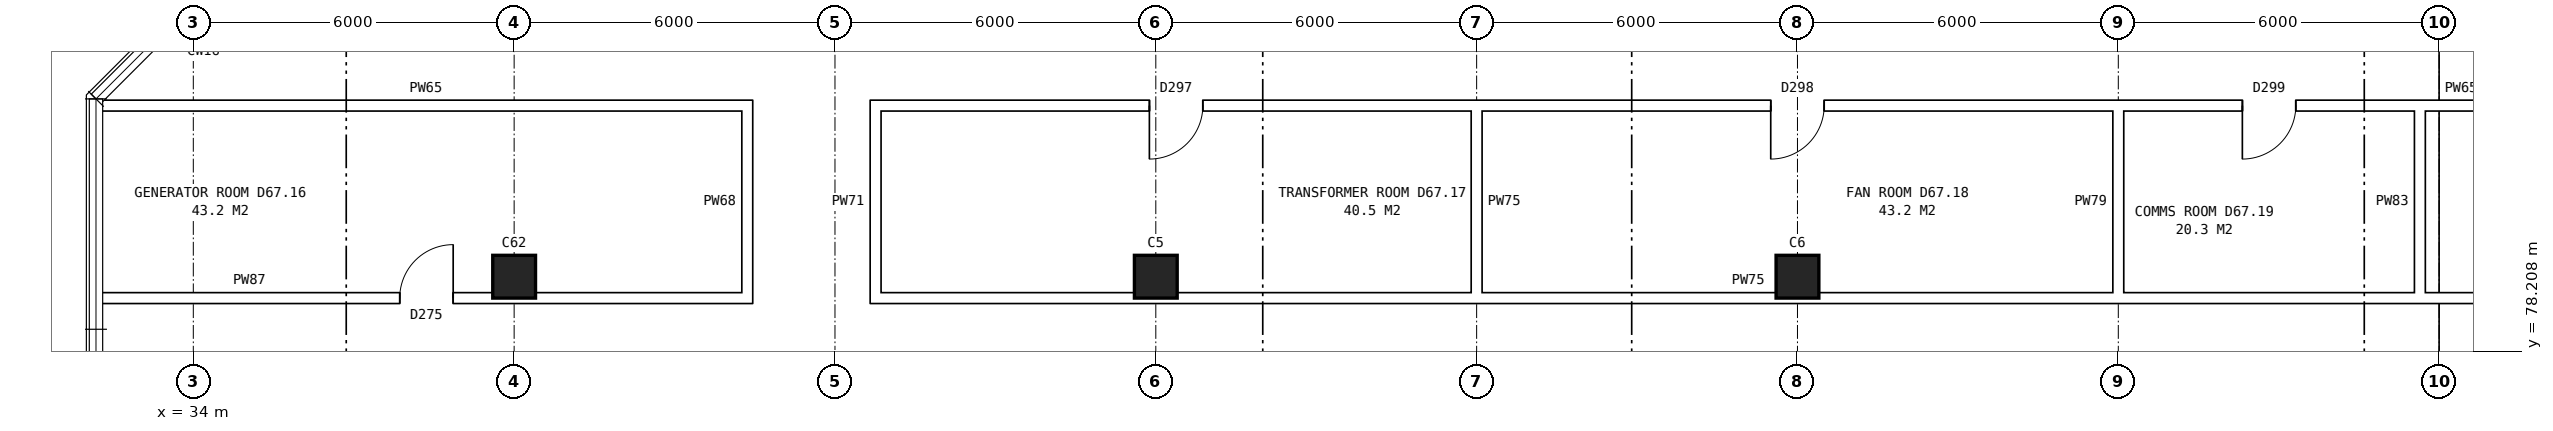
"""IFC4 building model, lengths in metres.
Left out: names, types, materials, properties, quantities, classifications, styles, units other than length and angle.
Written with IfcOpenShell. Run it as: python <this file> out.ifc"""

import sys

from ifc_helpers import new_model, si_unit, direction, frame, frame_2d, origin, origin_2d, place, context, subcontext, project, spatial, rectangle, extrude, element, fill, save


model = new_model("IFC4")
c1 = context("Model", 3, precision=1e-05, world=origin(), true_north=direction((0.0, 1.0)))
c2 = subcontext(c1, "Body", "Model", "MODEL_VIEW")
j1 = project(units=[si_unit("LENGTHUNIT", "METRE"), si_unit("PLANEANGLEUNIT", "RADIAN")], contexts=[c1])
p1 = place(None, origin())
s1 = spatial("IfcSite", under=j1, at=p1, CompositionType="ELEMENT")
p2 = place(p1, origin())
s2 = spatial("IfcBuilding", under=s1, at=p2, CompositionType="ELEMENT")
p3 = place(p2, frame((0.0, 0.0, 236.9)))
s3 = spatial("IfcBuildingStorey", under=s2, at=p3, CompositionType="ELEMENT", Elevation=236.9)
for number, where, z_axis, x_axis in (
    (1, (40.0, 79.6, 0.0), (0.0, 0.0, 1.0), (1.0, 0.0, 0.0)),
    (2, (52.0, 79.6, 0.0), (0.0, 0.0, 1.0), (1.0, 0.0, 0.0)),
    (3, (64.0, 79.6, 0.0), (0.0, 0.0, 1.0), (1.0, 0.0, 0.0)),
):
    element("IfcColumn", number, at=place(p3, frame(where, z_axis=z_axis, x_axis=x_axis)), inside=s3, PredefinedType="COLUMN", context=c2, shape_type="SweptSolid", body=[
        extrude(rectangle(XDim=0.8, YDim=0.8, at=origin_2d()), origin(), (0.0, 0.0, 1.0), 6.7),
    ])
p4 = place(p3, frame((32.24, 79.2, 0.0), z_axis=(0.0, 0.0, 1.0), x_axis=(1.0, 0.0, 0.0)))
e4 = element("IfcWall", 4, at=p4, inside=s3, PredefinedType="PARTITIONING", context=c2, shape_type="SweptSolid", body=[
    extrude(rectangle(XDim=12.22, YDim=0.2, at=frame_2d((6.11, 0.0))), origin(), (0.0, 0.0, 1.0), 6.7),
])
p5 = place(p4, frame((5.62, 0.0, 0.0)))
e5 = element("IfcOpeningElement", 5, at=p5, cuts=e4, PredefinedType="OPENING", context=c2, shape_type="SweptSolid", body=[
    extrude(rectangle(XDim=1.0, YDim=2.1, at=frame_2d((0.5, 1.05))), frame((0.0, 0.11, 0.0), z_axis=(0.0, -1.0, 0.0), x_axis=(1.0, 0.0, 0.0)), (0.0, 0.0, 1.0), 0.22),
])
p6 = place(p3, frame((46.66, 79.2, 0.0), z_axis=(0.0, 0.0, 1.0), x_axis=(1.0, 0.0, 0.0)))
e6 = element("IfcWall", 6, at=p6, inside=s3, PredefinedType="PARTITIONING", context=c2, shape_type="SweptSolid", body=[
    extrude(rectangle(XDim=122.1, YDim=0.2, at=frame_2d((61.05, 0.0))), origin(), (0.0, 0.0, 1.0), 6.7),
])
p7 = place(p3, frame((32.24, 82.8, 0.0), z_axis=(0.0, 0.0, 1.0), x_axis=(1.0, 0.0, 0.0)))
e7 = element("IfcWall", 7, at=p7, inside=s3, PredefinedType="PARTITIONING", context=c2, shape_type="SweptSolid", body=[
    extrude(rectangle(XDim=12.22, YDim=0.2, at=frame_2d((6.11, 0.0))), origin(), (0.0, 0.0, 1.0), 6.7),
])
p8 = place(p3, frame((46.66, 82.8, 0.0), z_axis=(0.0, 0.0, 1.0), x_axis=(1.0, 0.0, 0.0)))
e8 = element("IfcWall", 8, at=p8, inside=s3, PredefinedType="PARTITIONING", context=c2, shape_type="SweptSolid", body=[
    extrude(rectangle(XDim=122.1, YDim=0.2, at=frame_2d((61.05, 0.0))), origin(), (0.0, 0.0, 1.0), 6.7),
])
p9 = place(p8, frame((5.22, 0.0, 0.0)))
e9 = element("IfcOpeningElement", 9, at=p9, cuts=e8, PredefinedType="OPENING", context=c2, shape_type="SweptSolid", body=[
    extrude(rectangle(XDim=1.0, YDim=2.1, at=frame_2d((0.5, 1.05))), frame((0.0, 0.11, 0.0), z_axis=(0.0, -1.0, 0.0), x_axis=(1.0, 0.0, 0.0)), (0.0, 0.0, 1.0), 0.22),
])
p10 = place(p8, frame((16.84, 0.0, 0.0)))
e10 = element("IfcOpeningElement", 10, at=p10, cuts=e8, PredefinedType="OPENING", context=c2, shape_type="SweptSolid", body=[
    extrude(rectangle(XDim=1.0, YDim=2.1, at=frame_2d((0.5, 1.05))), frame((0.0, 0.11, 0.0), z_axis=(0.0, -1.0, 0.0), x_axis=(1.0, 0.0, 0.0)), (0.0, 0.0, 1.0), 0.22),
])
p11 = place(p8, frame((25.66, 0.0, 0.0)))
e11 = element("IfcOpeningElement", 11, at=p11, cuts=e8, PredefinedType="OPENING", context=c2, shape_type="SweptSolid", body=[
    extrude(rectangle(XDim=1.0, YDim=2.1, at=frame_2d((0.5, 1.05))), frame((0.0, 0.11, 0.0), z_axis=(0.0, -1.0, 0.0), x_axis=(1.0, 0.0, 0.0)), (0.0, 0.0, 1.0), 0.22),
])
p12 = place(p8, frame((35.535, 0.0, 0.0)))
e12 = element("IfcOpeningElement", 12, at=p12, cuts=e8, PredefinedType="OPENING", context=c2, shape_type="SweptSolid", body=[
    extrude(rectangle(XDim=1.0, YDim=2.1, at=frame_2d((0.5, 1.05))), frame((0.0, 0.11, 0.0), z_axis=(0.0, -1.0, 0.0), x_axis=(1.0, 0.0, 0.0)), (0.0, 0.0, 1.0), 0.22),
])
p13 = place(p8, frame((52.902, 0.0, 0.0)))
e13 = element("IfcOpeningElement", 13, at=p13, cuts=e8, PredefinedType="OPENING", context=c2, shape_type="SweptSolid", body=[
    extrude(rectangle(XDim=1.0, YDim=2.1, at=frame_2d((0.5, 1.05))), frame((0.0, 0.11, 0.0), z_axis=(0.0, -1.0, 0.0), x_axis=(1.0, 0.0, 0.0)), (0.0, 0.0, 1.0), 0.22),
])
p14 = place(p8, frame((73.708, 0.0, 0.0)))
e14 = element("IfcOpeningElement", 14, at=p14, cuts=e8, PredefinedType="OPENING", context=c2, shape_type="SweptSolid", body=[
    extrude(rectangle(XDim=1.0, YDim=2.1, at=frame_2d((0.5, 1.05))), frame((0.0, 0.11, 0.0), z_axis=(0.0, -1.0, 0.0), x_axis=(1.0, 0.0, 0.0)), (0.0, 0.0, 1.0), 0.22),
])
p15 = place(p8, frame((90.02, 0.0, 0.0)))
e15 = element("IfcOpeningElement", 15, at=p15, cuts=e8, PredefinedType="OPENING", context=c2, shape_type="SweptSolid", body=[
    extrude(rectangle(XDim=1.0, YDim=2.1, at=frame_2d((0.5, 1.05))), frame((0.0, 0.11, 0.0), z_axis=(0.0, -1.0, 0.0), x_axis=(1.0, 0.0, 0.0)), (0.0, 0.0, 1.0), 0.22),
])
p16 = place(p8, frame((101.84, 0.0, 0.0)))
e16 = element("IfcOpeningElement", 16, at=p16, cuts=e8, PredefinedType="OPENING", context=c2, shape_type="SweptSolid", body=[
    extrude(rectangle(XDim=1.0, YDim=2.1, at=frame_2d((0.5, 1.05))), frame((0.0, 0.11, 0.0), z_axis=(0.0, -1.0, 0.0), x_axis=(1.0, 0.0, 0.0)), (0.0, 0.0, 1.0), 0.22),
])
p17 = place(p8, frame((114.66, 0.0, 0.0)))
e17 = element("IfcOpeningElement", 17, at=p17, cuts=e8, PredefinedType="OPENING", context=c2, shape_type="SweptSolid", body=[
    extrude(rectangle(XDim=1.0, YDim=2.1, at=frame_2d((0.5, 1.05))), frame((0.0, 0.11, 0.0), z_axis=(0.0, -1.0, 0.0), x_axis=(1.0, 0.0, 0.0)), (0.0, 0.0, 1.0), 0.22),
])
for number, where, z_axis, x_axis in (
    (18, (44.36, 79.1, 0.0), (0.0, 0.0, 1.0), (0.0, 1.0, 0.0)),
    (19, (46.76, 79.1, 0.0), (0.0, 0.0, 1.0), (0.0, 1.0, 0.0)),
    (20, (58.0, 79.1, 0.0), (0.0, 0.0, 1.0), (0.0, 1.0, 0.0)),
    (21, (70.0, 79.1, 0.0), (0.0, 0.0, 1.0), (0.0, 1.0, 0.0)),
    (22, (75.64, 79.1, 0.0), (0.0, 0.0, 1.0), (0.0, 1.0, 0.0)),
):
    element("IfcWall", number, at=place(p3, frame(where, z_axis=z_axis, x_axis=x_axis)), inside=s3, PredefinedType="PARTITIONING", context=c2, shape_type="SweptSolid", body=[
        extrude(rectangle(XDim=3.8, YDim=0.2, at=frame_2d((1.9, 0.0))), origin(), (0.0, 0.0, 1.0), 6.7),
    ])
p18 = place(p5, origin())
e23 = element("IfcDoor", 23, at=p18, inside=s3, OperationType="SINGLE_SWING_RIGHT", PredefinedType="DOOR", context=c2, shape_type="SweptSolid", body=[
    extrude(rectangle(XDim=1.0, YDim=2.1, at=frame_2d((0.5, 1.05))), frame((0.0, 0.025, 0.0), z_axis=(0.0, -1.0, 0.0), x_axis=(1.0, 0.0, 0.0)), (0.0, 0.0, 1.0), 0.05),
])
fill(e5, e23)
p19 = place(p9, frame((1.0, 0.0, 0.0), z_axis=(0.0, 0.0, 1.0), x_axis=(-1.0, 0.0, 0.0)))
e24 = element("IfcDoor", 24, at=p19, inside=s3, OperationType="SINGLE_SWING_RIGHT", PredefinedType="DOOR", context=c2, shape_type="SweptSolid", body=[
    extrude(rectangle(XDim=1.0, YDim=2.1, at=frame_2d((0.5, 1.05))), frame((0.0, 0.025, 0.0), z_axis=(0.0, -1.0, 0.0), x_axis=(1.0, 0.0, 0.0)), (0.0, 0.0, 1.0), 0.05),
])
fill(e9, e24)
p20 = place(p10, frame((1.0, 0.0, 0.0), z_axis=(0.0, 0.0, 1.0), x_axis=(-1.0, 0.0, 0.0)))
e25 = element("IfcDoor", 25, at=p20, inside=s3, OperationType="SINGLE_SWING_RIGHT", PredefinedType="DOOR", context=c2, shape_type="SweptSolid", body=[
    extrude(rectangle(XDim=1.0, YDim=2.1, at=frame_2d((0.5, 1.05))), frame((0.0, 0.025, 0.0), z_axis=(0.0, -1.0, 0.0), x_axis=(1.0, 0.0, 0.0)), (0.0, 0.0, 1.0), 0.05),
])
fill(e10, e25)
p21 = place(p11, frame((1.0, 0.0, 0.0), z_axis=(0.0, 0.0, 1.0), x_axis=(-1.0, 0.0, 0.0)))
e26 = element("IfcDoor", 26, at=p21, inside=s3, OperationType="SINGLE_SWING_RIGHT", PredefinedType="DOOR", context=c2, shape_type="SweptSolid", body=[
    extrude(rectangle(XDim=1.0, YDim=2.1, at=frame_2d((0.5, 1.05))), frame((0.0, 0.025, 0.0), z_axis=(0.0, -1.0, 0.0), x_axis=(1.0, 0.0, 0.0)), (0.0, 0.0, 1.0), 0.05),
])
fill(e11, e26)
save(model, sys.argv[1])
